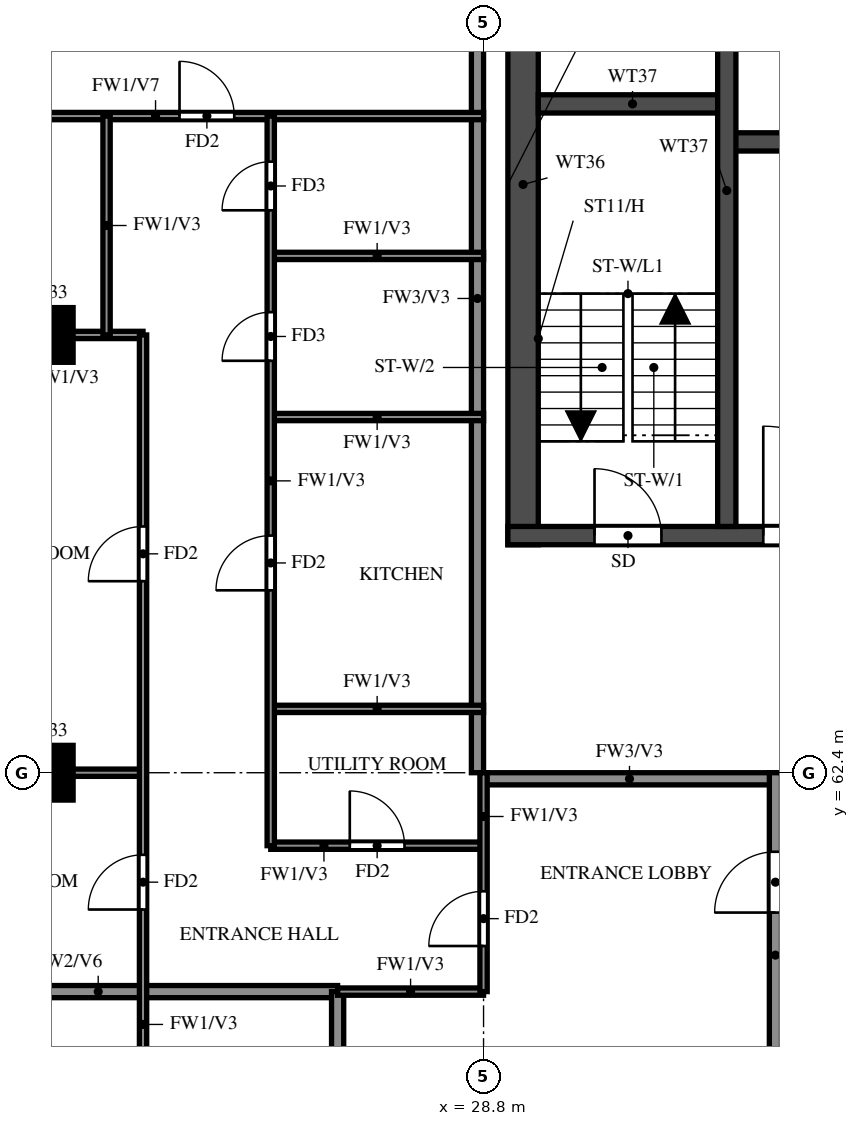
"""IFC4 building model, lengths in metres.
Left out: names, types, materials, properties, quantities, classifications, styles, units other than length and angle.
Written with IfcOpenShell. Run it as: python <this file> out.ifc"""

import sys

from ifc_helpers import new_model, si_unit, direction, frame, frame_2d, origin, origin_2d, place, context, subcontext, project, spatial, rectangle, extrude, source, transform, mapped, element, fill, save


model = new_model("IFC4")
c1 = context("Model", 3, precision=1e-05, world=origin(), true_north=direction((0.0, 1.0)))
c2 = subcontext(c1, "Body", "Model", "MODEL_VIEW")
j1 = project(units=[si_unit("LENGTHUNIT", "METRE"), si_unit("PLANEANGLEUNIT", "RADIAN")], contexts=[c1])
p1 = place(None, origin())
s1 = spatial("IfcSite", under=j1, at=p1, CompositionType="ELEMENT")
p2 = place(p1, origin())
s2 = spatial("IfcBuilding", under=s1, at=p2, CompositionType="ELEMENT")
p3 = place(p2, frame((0.0, 0.0, 211.5)))
s3 = spatial("IfcBuildingStorey", under=s2, at=p3, CompositionType="ELEMENT", Elevation=211.5)
m1 = source(origin(), c2, "Body", "SweptSolid", [
    extrude(rectangle(XDim=0.9, YDim=0.9, at=origin_2d()), origin(), (0.0, 0.0, 1.0), 3.22),
])
for number, where, z_axis, x_axis in (
    (1, (21.6, 62.4, 0.0), (0.0, 0.0, 1.0), (1.0, 0.0, 0.0)),
    (2, (21.6, 69.6, 0.0), (0.0, 0.0, 1.0), (1.0, 0.0, 0.0)),
):
    element("IfcColumn", number, at=place(p3, frame(where, z_axis=z_axis, x_axis=x_axis)), inside=s3, PredefinedType="COLUMN", context=c2, shape_type="MappedRepresentation", body=[
        mapped(m1, transform((0.0, 0.0, 0.0))),
    ])
p4 = place(p3, frame((29.45, 66.15, 0.0), z_axis=(0.0, 0.0, 1.0), x_axis=(0.0, 1.0, 0.0)))
e3 = element("IfcWall", 3, at=p4, inside=s3, PredefinedType="SHEAR", context=c2, shape_type="SweptSolid", body=[
    extrude(rectangle(XDim=11.85, YDim=0.5, at=frame_2d((5.925, 0.0))), origin(), (0.0, 0.0, 1.0), 3.22),
])
p5 = place(p3, frame((29.2, 66.3, 0.0), z_axis=(0.0, 0.0, 1.0), x_axis=(1.0, 0.0, 0.0)))
e4 = element("IfcWall", 4, at=p5, inside=s3, PredefinedType="SHEAR", context=c2, shape_type="SweptSolid", body=[
    extrude(rectangle(XDim=42.4, YDim=0.3, at=frame_2d((21.2, 0.0))), origin(), (0.0, 0.0, 1.0), 3.22),
])
p6 = place(p5, frame((1.425, 0.0, 0.0)))
e5 = element("IfcOpeningElement", 5, at=p6, cuts=e4, PredefinedType="OPENING", context=c2, shape_type="SweptSolid", body=[
    extrude(rectangle(XDim=1.1, YDim=2.1, at=frame_2d((0.55, 1.05))), frame((0.0, 0.16, 0.0), z_axis=(0.0, -1.0, 0.0), x_axis=(1.0, 0.0, 0.0)), (0.0, 0.0, 1.0), 0.32),
])
p7 = place(p5, frame((4.2, 0.0, 0.0)))
e6 = element("IfcOpeningElement", 6, at=p7, cuts=e4, PredefinedType="OPENING", context=c2, shape_type="SweptSolid", body=[
    extrude(rectangle(XDim=1.8, YDim=2.1, at=frame_2d((0.9, 1.05))), frame((0.0, 0.16, 0.0), z_axis=(0.0, -1.0, 0.0), x_axis=(1.0, 0.0, 0.0)), (0.0, 0.0, 1.0), 0.32),
])
p8 = place(p3, frame((32.8, 72.775, 0.0), z_axis=(0.0, 0.0, 1.0), x_axis=(1.0, 0.0, 0.0)))
e7 = element("IfcWall", 7, at=p8, inside=s3, PredefinedType="SHEAR", context=c2, shape_type="SweptSolid", body=[
    extrude(rectangle(XDim=35.2, YDim=0.3, at=frame_2d((17.6, 0.0))), origin(), (0.0, 0.0, 1.0), 3.22),
])
p9 = place(p8, frame((19.8, 0.0, 0.0)))
e8 = element("IfcOpeningElement", 8, at=p9, cuts=e7, PredefinedType="OPENING", context=c2, shape_type="SweptSolid", body=[
    extrude(rectangle(XDim=1.1, YDim=2.1, at=frame_2d((0.55, 1.05))), frame((0.0, 0.16, 0.0), z_axis=(0.0, -1.0, 0.0), x_axis=(1.0, 0.0, 0.0)), (0.0, 0.0, 1.0), 0.32),
])
p10 = place(p8, frame((27.725, 0.0, 0.0)))
e9 = element("IfcOpeningElement", 9, at=p10, cuts=e7, PredefinedType="OPENING", context=c2, shape_type="SweptSolid", body=[
    extrude(rectangle(XDim=1.1, YDim=2.1, at=frame_2d((0.55, 1.05))), frame((0.0, 0.16, 0.0), z_axis=(0.0, -1.0, 0.0), x_axis=(1.0, 0.0, 0.0)), (0.0, 0.0, 1.0), 0.32),
])
p11 = place(p8, frame((30.325, 0.0, 0.0)))
e10 = element("IfcOpeningElement", 10, at=p11, cuts=e7, PredefinedType="OPENING", context=c2, shape_type="SweptSolid", body=[
    extrude(rectangle(XDim=1.1, YDim=2.1, at=frame_2d((0.55, 1.05))), frame((0.0, 0.16, 0.0), z_axis=(0.0, -1.0, 0.0), x_axis=(1.0, 0.0, 0.0)), (0.0, 0.0, 1.0), 0.32),
])
p12 = place(p8, frame((3.825, 0.0, 0.0)))
e11 = element("IfcOpeningElement", 11, at=p12, cuts=e7, PredefinedType="OPENING", context=c2, shape_type="SweptSolid", body=[
    extrude(rectangle(XDim=1.1, YDim=2.1, at=frame_2d((0.55, 1.05))), frame((0.0, 0.16, 0.0), z_axis=(0.0, -1.0, 0.0), x_axis=(1.0, 0.0, 0.0)), (0.0, 0.0, 1.0), 0.32),
])
p13 = place(p8, frame((6.575, 0.0, 0.0)))
e12 = element("IfcOpeningElement", 12, at=p13, cuts=e7, PredefinedType="OPENING", context=c2, shape_type="SweptSolid", body=[
    extrude(rectangle(XDim=1.1, YDim=2.1, at=frame_2d((0.55, 1.05))), frame((0.0, 0.16, 0.0), z_axis=(0.0, -1.0, 0.0), x_axis=(1.0, 0.0, 0.0)), (0.0, 0.0, 1.0), 0.32),
])
p14 = place(p8, frame((9.325, 0.0, 0.0)))
e13 = element("IfcOpeningElement", 13, at=p14, cuts=e7, PredefinedType="OPENING", context=c2, shape_type="SweptSolid", body=[
    extrude(rectangle(XDim=1.1, YDim=2.1, at=frame_2d((0.55, 1.05))), frame((0.0, 0.16, 0.0), z_axis=(0.0, -1.0, 0.0), x_axis=(1.0, 0.0, 0.0)), (0.0, 0.0, 1.0), 0.32),
])
p15 = place(p8, frame((12.075, 0.0, 0.0)))
e14 = element("IfcOpeningElement", 14, at=p15, cuts=e7, PredefinedType="OPENING", context=c2, shape_type="SweptSolid", body=[
    extrude(rectangle(XDim=1.1, YDim=2.1, at=frame_2d((0.55, 1.05))), frame((0.0, 0.16, 0.0), z_axis=(0.0, -1.0, 0.0), x_axis=(1.0, 0.0, 0.0)), (0.0, 0.0, 1.0), 0.32),
])
p16 = place(p8, frame((14.825, 0.0, 0.0)))
e15 = element("IfcOpeningElement", 15, at=p16, cuts=e7, PredefinedType="OPENING", context=c2, shape_type="SweptSolid", body=[
    extrude(rectangle(XDim=1.1, YDim=2.1, at=frame_2d((0.55, 1.05))), frame((0.0, 0.16, 0.0), z_axis=(0.0, -1.0, 0.0), x_axis=(1.0, 0.0, 0.0)), (0.0, 0.0, 1.0), 0.32),
])
p17 = place(p8, frame((17.575, 0.0, 0.0)))
e16 = element("IfcOpeningElement", 16, at=p17, cuts=e7, PredefinedType="OPENING", context=c2, shape_type="SweptSolid", body=[
    extrude(rectangle(XDim=1.1, YDim=2.1, at=frame_2d((0.55, 1.05))), frame((0.0, 0.16, 0.0), z_axis=(0.0, -1.0, 0.0), x_axis=(1.0, 0.0, 0.0)), (0.0, 0.0, 1.0), 0.32),
])
p18 = place(p8, frame((0.95, 0.0, 0.0)))
e17 = element("IfcOpeningElement", 17, at=p18, cuts=e7, PredefinedType="OPENING", context=c2, shape_type="SweptSolid", body=[
    extrude(rectangle(XDim=1.1, YDim=2.1, at=frame_2d((0.55, 1.05))), frame((0.0, 0.16, 0.0), z_axis=(0.0, -1.0, 0.0), x_axis=(1.0, 0.0, 0.0)), (0.0, 0.0, 1.0), 0.32),
])
p19 = place(p3, frame((29.7, 73.4, 0.0), z_axis=(0.0, 0.0, 1.0), x_axis=(1.0, 0.0, 0.0)))
e18 = element("IfcWall", 18, at=p19, inside=s3, PredefinedType="SHEAR", context=c2, shape_type="SweptSolid", body=[
    extrude(rectangle(XDim=3.1, YDim=0.3, at=frame_2d((1.55, 0.0))), origin(), (0.0, 0.0, 1.0), 3.22),
])
p20 = place(p3, frame((32.8, 66.45, 0.0), z_axis=(0.0, 0.0, 1.0), x_axis=(0.0, 1.0, 0.0)))
e19 = element("IfcWall", 19, at=p20, inside=s3, PredefinedType="SHEAR", context=c2, shape_type="SweptSolid", body=[
    extrude(rectangle(XDim=11.05, YDim=0.3, at=frame_2d((5.525, 0.0))), origin(), (0.0, 0.0, 1.0), 3.22),
])
p21 = place(p3, frame((28.8, 62.3, 0.0), z_axis=(0.0, 0.0, 1.0), x_axis=(1.0, 0.0, 0.0)))
e20 = element("IfcWall", 20, at=p21, inside=s3, PredefinedType="SOLIDWALL", context=c2, shape_type="SweptSolid", body=[
    extrude(rectangle(XDim=4.8, YDim=0.2, at=frame_2d((2.4, 0.0))), origin(), (0.0, 0.0, 1.0), 3.22),
])
p22 = place(p3, frame((28.7, 62.4, 0.0), z_axis=(0.0, 0.0, 1.0), x_axis=(0.0, 1.0, 0.0)))
e21 = element("IfcWall", 21, at=p22, inside=s3, PredefinedType="SOLIDWALL", context=c2, shape_type="SweptSolid", body=[
    extrude(rectangle(XDim=15.6, YDim=0.2, at=frame_2d((7.8, 0.0))), origin(), (0.0, 0.0, 1.0), 3.22),
])
p23 = place(p3, frame((33.6, 56.4, 0.0), z_axis=(0.0, 0.0, 1.0), x_axis=(0.0, 1.0, 0.0)))
e22 = element("IfcWall", 22, at=p23, inside=s3, PredefinedType="SOLIDWALL", context=c2, shape_type="SweptSolid", body=[
    extrude(rectangle(XDim=6.0, YDim=0.2, at=frame_2d((3.0, 0.0))), origin(), (0.0, 0.0, 1.0), 3.22),
])
p24 = place(p23, frame((3.7, 0.0, 0.0)))
e23 = element("IfcOpeningElement", 23, at=p24, cuts=e22, PredefinedType="OPENING", context=c2, shape_type="SweptSolid", body=[
    extrude(rectangle(XDim=1.0, YDim=2.1, at=frame_2d((0.5, 1.05))), frame((0.0, 0.11, 0.0), z_axis=(0.0, -1.0, 0.0), x_axis=(1.0, 0.0, 0.0)), (0.0, 0.0, 1.0), 0.22),
])
p25 = place(p3, frame((18.525, 58.8, 0.0), z_axis=(0.0, 0.0, 1.0), x_axis=(1.0, 0.0, 0.0)))
e24 = element("IfcWall", 24, at=p25, inside=s3, PredefinedType="SOLIDWALL", context=c2, shape_type="SweptSolid", body=[
    extrude(rectangle(XDim=7.875, YDim=0.2, at=frame_2d((3.938, 0.0))), origin(), (0.0, 0.0, 1.0), 2.32),
])
p26 = place(p3, frame((26.4, 56.4, 0.0), z_axis=(0.0, 0.0, 1.0), x_axis=(0.0, 1.0, 0.0)))
e25 = element("IfcWall", 25, at=p26, inside=s3, PredefinedType="SOLIDWALL", context=c2, shape_type="SweptSolid", body=[
    extrude(rectangle(XDim=2.4, YDim=0.2, at=frame_2d((1.2, 0.0))), origin(), (0.0, 0.0, 1.0), 3.22),
])
p27 = place(p3, frame((26.4, 58.8, 0.0), z_axis=(0.0, 0.0, 1.0), x_axis=(1.0, 0.0, 0.0)))
e26 = element("IfcWall", 26, at=p27, inside=s3, PredefinedType="PARTITIONING", context=c2, shape_type="SweptSolid", body=[
    extrude(rectangle(XDim=2.4, YDim=0.12, at=frame_2d((1.2, 0.0))), origin(), (0.0, 0.0, 1.0), 3.22),
])
p28 = place(p3, frame((25.3, 61.2, 0.0), z_axis=(0.0, 0.0, 1.0), x_axis=(1.0, 0.0, 0.0)))
e27 = element("IfcWall", 27, at=p28, inside=s3, PredefinedType="PARTITIONING", context=c2, shape_type="SweptSolid", body=[
    extrude(rectangle(XDim=3.5, YDim=0.12, at=frame_2d((1.75, 0.0))), origin(), (0.0, 0.0, 1.0), 3.22),
])
p29 = place(p28, frame((1.3, 0.0, 0.0)))
e28 = element("IfcOpeningElement", 28, at=p29, cuts=e27, PredefinedType="OPENING", context=c2, shape_type="SweptSolid", body=[
    extrude(rectangle(XDim=0.9, YDim=2.1, at=frame_2d((0.45, 1.05))), frame((0.0, 0.07, 0.0), z_axis=(0.0, -1.0, 0.0), x_axis=(1.0, 0.0, 0.0)), (0.0, 0.0, 1.0), 0.14),
])
p30 = place(p3, frame((18.525, 62.4, 0.0), z_axis=(0.0, 0.0, 1.0), x_axis=(1.0, 0.0, 0.0)))
e29 = element("IfcWall", 29, at=p30, inside=s3, PredefinedType="PARTITIONING", context=c2, shape_type="SweptSolid", body=[
    extrude(rectangle(XDim=4.675, YDim=0.12, at=frame_2d((2.337, 0.0))), origin(), (0.0, 0.0, 1.0), 3.22),
])
for number, where, z_axis, x_axis in (
    (30, (25.3, 63.45, 0.0), (0.0, 0.0, 1.0), (1.0, 0.0, 0.0)),
    (31, (25.3, 68.25, 0.0), (0.0, 0.0, 1.0), (1.0, 0.0, 0.0)),
):
    element("IfcWall", number, at=place(p3, frame(where, z_axis=z_axis, x_axis=x_axis)), inside=s3, PredefinedType="PARTITIONING", context=c2, shape_type="SweptSolid", body=[
        extrude(rectangle(XDim=3.5, YDim=0.12, at=frame_2d((1.75, 0.0))), origin(), (0.0, 0.0, 1.0), 3.22),
    ])
p31 = place(p3, frame((18.525, 69.6, 0.0), z_axis=(0.0, 0.0, 1.0), x_axis=(1.0, 0.0, 0.0)))
e32 = element("IfcWall", 32, at=p31, inside=s3, PredefinedType="PARTITIONING", context=c2, shape_type="SweptSolid", body=[
    extrude(rectangle(XDim=4.675, YDim=0.12, at=frame_2d((2.337, 0.0))), origin(), (0.0, 0.0, 1.0), 3.22),
])
p32 = place(p31, frame((1.538, 0.0, 0.0)))
e33 = element("IfcOpeningElement", 33, at=p32, cuts=e32, PredefinedType="OPENING", context=c2, shape_type="SweptSolid", body=[
    extrude(rectangle(XDim=0.8, YDim=2.1, at=frame_2d((0.4, 1.05))), frame((0.0, 0.07, 0.0), z_axis=(0.0, -1.0, 0.0), x_axis=(1.0, 0.0, 0.0)), (0.0, 0.0, 1.0), 0.14),
])
p33 = place(p3, frame((25.3, 70.9, 0.0), z_axis=(0.0, 0.0, 1.0), x_axis=(1.0, 0.0, 0.0)))
e34 = element("IfcWall", 34, at=p33, inside=s3, PredefinedType="PARTITIONING", context=c2, shape_type="SweptSolid", body=[
    extrude(rectangle(XDim=3.5, YDim=0.12, at=frame_2d((1.75, 0.0))), origin(), (0.0, 0.0, 1.0), 3.22),
])
p34 = place(p3, frame((18.525, 73.2, 0.0), z_axis=(0.0, 0.0, 1.0), x_axis=(1.0, 0.0, 0.0)))
e35 = element("IfcWall", 35, at=p34, inside=s3, PredefinedType="PARTITIONING", context=c2, shape_type="SweptSolid", body=[
    extrude(rectangle(XDim=10.275, YDim=0.12, at=frame_2d((5.138, 0.0))), origin(), (0.0, 0.0, 1.0), 2.32),
])
p35 = place(p34, frame((5.275, 0.0, 0.0)))
e36 = element("IfcOpeningElement", 36, at=p35, cuts=e35, PredefinedType="OPENING", context=c2, shape_type="SweptSolid", body=[
    extrude(rectangle(XDim=0.9, YDim=2.1, at=frame_2d((0.45, 1.05))), frame((0.0, 0.07, 0.0), z_axis=(0.0, -1.0, 0.0), x_axis=(1.0, 0.0, 0.0)), (0.0, 0.0, 1.0), 0.14),
])
p36 = place(p3, frame((22.6, 69.6, 0.0), z_axis=(0.0, 0.0, 1.0), x_axis=(0.0, 1.0, 0.0)))
e37 = element("IfcWall", 37, at=p36, inside=s3, PredefinedType="PARTITIONING", context=c2, shape_type="SweptSolid", body=[
    extrude(rectangle(XDim=3.6, YDim=0.12, at=frame_2d((1.8, 0.0))), origin(), (0.0, 0.0, 1.0), 3.22),
])
p37 = place(p3, frame((23.2, 48.0, 0.0), z_axis=(0.0, 0.0, 1.0), x_axis=(0.0, 1.0, 0.0)))
e38 = element("IfcWall", 38, at=p37, inside=s3, PredefinedType="PARTITIONING", context=c2, shape_type="SweptSolid", body=[
    extrude(rectangle(XDim=21.6, YDim=0.12, at=frame_2d((10.8, 0.0))), origin(), (0.0, 0.0, 1.0), 3.22),
])
p38 = place(p37, frame((1.35, 0.0, 0.0)))
e39 = element("IfcOpeningElement", 39, at=p38, cuts=e38, PredefinedType="OPENING", context=c2, shape_type="SweptSolid", body=[
    extrude(rectangle(XDim=0.9, YDim=2.1, at=frame_2d((0.45, 1.05))), frame((0.0, 0.07, 0.0), z_axis=(0.0, -1.0, 0.0), x_axis=(1.0, 0.0, 0.0)), (0.0, 0.0, 1.0), 0.14),
])
p39 = place(p37, frame((4.95, 0.0, 0.0)))
e40 = element("IfcOpeningElement", 40, at=p39, cuts=e38, PredefinedType="OPENING", context=c2, shape_type="SweptSolid", body=[
    extrude(rectangle(XDim=0.9, YDim=2.1, at=frame_2d((0.45, 1.05))), frame((0.0, 0.07, 0.0), z_axis=(0.0, -1.0, 0.0), x_axis=(1.0, 0.0, 0.0)), (0.0, 0.0, 1.0), 0.14),
])
p40 = place(p37, frame((8.25, 0.0, 0.0)))
e41 = element("IfcOpeningElement", 41, at=p40, cuts=e38, PredefinedType="OPENING", context=c2, shape_type="SweptSolid", body=[
    extrude(rectangle(XDim=1.5, YDim=2.1, at=frame_2d((0.75, 1.05))), frame((0.0, 0.07, 0.0), z_axis=(0.0, -1.0, 0.0), x_axis=(1.0, 0.0, 0.0)), (0.0, 0.0, 1.0), 0.14),
])
p41 = place(p37, frame((12.15, 0.0, 0.0)))
e42 = element("IfcOpeningElement", 42, at=p41, cuts=e38, PredefinedType="OPENING", context=c2, shape_type="SweptSolid", body=[
    extrude(rectangle(XDim=0.9, YDim=2.1, at=frame_2d((0.45, 1.05))), frame((0.0, 0.07, 0.0), z_axis=(0.0, -1.0, 0.0), x_axis=(1.0, 0.0, 0.0)), (0.0, 0.0, 1.0), 0.14),
])
p42 = place(p37, frame((17.55, 0.0, 0.0)))
e43 = element("IfcOpeningElement", 43, at=p42, cuts=e38, PredefinedType="OPENING", context=c2, shape_type="SweptSolid", body=[
    extrude(rectangle(XDim=0.9, YDim=2.1, at=frame_2d((0.45, 1.05))), frame((0.0, 0.07, 0.0), z_axis=(0.0, -1.0, 0.0), x_axis=(1.0, 0.0, 0.0)), (0.0, 0.0, 1.0), 0.14),
])
p43 = place(p3, frame((25.3, 61.2, 0.0), z_axis=(0.0, 0.0, 1.0), x_axis=(0.0, 1.0, 0.0)))
e44 = element("IfcWall", 44, at=p43, inside=s3, PredefinedType="PARTITIONING", context=c2, shape_type="SweptSolid", body=[
    extrude(rectangle(XDim=12.0, YDim=0.12, at=frame_2d((6.0, 0.0))), origin(), (0.0, 0.0, 1.0), 3.22),
])
p44 = place(p43, frame((4.2, 0.0, 0.0)))
e45 = element("IfcOpeningElement", 45, at=p44, cuts=e44, PredefinedType="OPENING", context=c2, shape_type="SweptSolid", body=[
    extrude(rectangle(XDim=0.9, YDim=2.1, at=frame_2d((0.45, 1.05))), frame((0.0, 0.07, 0.0), z_axis=(0.0, -1.0, 0.0), x_axis=(1.0, 0.0, 0.0)), (0.0, 0.0, 1.0), 0.14),
])
p45 = place(p43, frame((7.975, 0.0, 0.0)))
e46 = element("IfcOpeningElement", 46, at=p45, cuts=e44, PredefinedType="OPENING", context=c2, shape_type="SweptSolid", body=[
    extrude(rectangle(XDim=0.8, YDim=2.1, at=frame_2d((0.4, 1.05))), frame((0.0, 0.07, 0.0), z_axis=(0.0, -1.0, 0.0), x_axis=(1.0, 0.0, 0.0)), (0.0, 0.0, 1.0), 0.14),
])
p46 = place(p43, frame((10.45, 0.0, 0.0)))
e47 = element("IfcOpeningElement", 47, at=p46, cuts=e44, PredefinedType="OPENING", context=c2, shape_type="SweptSolid", body=[
    extrude(rectangle(XDim=0.8, YDim=2.1, at=frame_2d((0.4, 1.05))), frame((0.0, 0.07, 0.0), z_axis=(0.0, -1.0, 0.0), x_axis=(1.0, 0.0, 0.0)), (0.0, 0.0, 1.0), 0.14),
])
p47 = place(p3, frame((28.8, 58.8, 0.0), z_axis=(0.0, 0.0, 1.0), x_axis=(0.0, 1.0, 0.0)))
e48 = element("IfcWall", 48, at=p47, inside=s3, PredefinedType="PARTITIONING", context=c2, shape_type="SweptSolid", body=[
    extrude(rectangle(XDim=3.6, YDim=0.12, at=frame_2d((1.8, 0.0))), origin(), (0.0, 0.0, 1.0), 3.22),
])
p48 = place(p47, frame((0.75, 0.0, 0.0)))
e49 = element("IfcOpeningElement", 49, at=p48, cuts=e48, PredefinedType="OPENING", context=c2, shape_type="SweptSolid", body=[
    extrude(rectangle(XDim=0.9, YDim=2.1, at=frame_2d((0.45, 1.05))), frame((0.0, 0.07, 0.0), z_axis=(0.0, -1.0, 0.0), x_axis=(1.0, 0.0, 0.0)), (0.0, 0.0, 1.0), 0.14),
])
p49 = place(p6, origin())
e50 = element("IfcDoor", 50, at=p49, inside=s3, OperationType="SINGLE_SWING_LEFT", PredefinedType="DOOR", context=c2, shape_type="SweptSolid", body=[
    extrude(rectangle(XDim=1.1, YDim=2.1, at=frame_2d((0.55, 1.05))), frame((0.0, 0.025, 0.0), z_axis=(0.0, -1.0, 0.0), x_axis=(1.0, 0.0, 0.0)), (0.0, 0.0, 1.0), 0.05),
])
fill(e5, e50)
p50 = place(p7, origin())
e51 = element("IfcDoor", 51, at=p50, inside=s3, OperationType="DOUBLE_DOOR_SINGLE_SWING", PredefinedType="DOOR", context=c2, shape_type="SweptSolid", body=[
    extrude(rectangle(XDim=1.8, YDim=2.1, at=frame_2d((0.9, 1.05))), frame((0.0, 0.025, 0.0), z_axis=(0.0, -1.0, 0.0), x_axis=(1.0, 0.0, 0.0)), (0.0, 0.0, 1.0), 0.05),
])
fill(e6, e51)
p51 = place(p48, origin())
e52 = element("IfcDoor", 52, at=p51, inside=s3, OperationType="SINGLE_SWING_RIGHT", PredefinedType="DOOR", context=c2, shape_type="SweptSolid", body=[
    extrude(rectangle(XDim=0.9, YDim=2.1, at=frame_2d((0.45, 1.05))), frame((0.0, 0.025, 0.0), z_axis=(0.0, -1.0, 0.0), x_axis=(1.0, 0.0, 0.0)), (0.0, 0.0, 1.0), 0.05),
])
fill(e49, e52)
p52 = place(p24, origin())
e53 = element("IfcDoor", 53, at=p52, inside=s3, OperationType="SINGLE_SWING_LEFT", PredefinedType="DOOR", context=c2, shape_type="SweptSolid", body=[
    extrude(rectangle(XDim=1.0, YDim=2.1, at=frame_2d((0.5, 1.05))), frame((0.0, 0.025, 0.0), z_axis=(0.0, -1.0, 0.0), x_axis=(1.0, 0.0, 0.0)), (0.0, 0.0, 1.0), 0.05),
])
fill(e23, e53)
p53 = place(p41, origin())
e54 = element("IfcDoor", 54, at=p53, inside=s3, OperationType="SINGLE_SWING_LEFT", PredefinedType="DOOR", context=c2, shape_type="SweptSolid", body=[
    extrude(rectangle(XDim=0.9, YDim=2.1, at=frame_2d((0.45, 1.05))), frame((0.0, 0.025, 0.0), z_axis=(0.0, -1.0, 0.0), x_axis=(1.0, 0.0, 0.0)), (0.0, 0.0, 1.0), 0.05),
])
fill(e42, e54)
p54 = place(p42, origin())
e55 = element("IfcDoor", 55, at=p54, inside=s3, OperationType="SINGLE_SWING_RIGHT", PredefinedType="DOOR", context=c2, shape_type="SweptSolid", body=[
    extrude(rectangle(XDim=0.9, YDim=2.1, at=frame_2d((0.45, 1.05))), frame((0.0, 0.025, 0.0), z_axis=(0.0, -1.0, 0.0), x_axis=(1.0, 0.0, 0.0)), (0.0, 0.0, 1.0), 0.05),
])
fill(e43, e55)
p55 = place(p35, origin())
e56 = element("IfcDoor", 56, at=p55, inside=s3, OperationType="SINGLE_SWING_LEFT", PredefinedType="DOOR", context=c2, shape_type="SweptSolid", body=[
    extrude(rectangle(XDim=0.9, YDim=2.1, at=frame_2d((0.45, 1.05))), frame((0.0, 0.025, 0.0), z_axis=(0.0, -1.0, 0.0), x_axis=(1.0, 0.0, 0.0)), (0.0, 0.0, 1.0), 0.05),
])
fill(e36, e56)
p56 = place(p29, origin())
e57 = element("IfcDoor", 57, at=p56, inside=s3, OperationType="SINGLE_SWING_RIGHT", PredefinedType="DOOR", context=c2, shape_type="SweptSolid", body=[
    extrude(rectangle(XDim=0.9, YDim=2.1, at=frame_2d((0.45, 1.05))), frame((0.0, 0.025, 0.0), z_axis=(0.0, -1.0, 0.0), x_axis=(1.0, 0.0, 0.0)), (0.0, 0.0, 1.0), 0.05),
])
fill(e28, e57)
p57 = place(p44, origin())
e58 = element("IfcDoor", 58, at=p57, inside=s3, OperationType="SINGLE_SWING_LEFT", PredefinedType="DOOR", context=c2, shape_type="SweptSolid", body=[
    extrude(rectangle(XDim=0.9, YDim=2.1, at=frame_2d((0.45, 1.05))), frame((0.0, 0.025, 0.0), z_axis=(0.0, -1.0, 0.0), x_axis=(1.0, 0.0, 0.0)), (0.0, 0.0, 1.0), 0.05),
])
fill(e45, e58)
p58 = place(p45, origin())
e59 = element("IfcDoor", 59, at=p58, inside=s3, OperationType="SINGLE_SWING_LEFT", PredefinedType="DOOR", context=c2, shape_type="SweptSolid", body=[
    extrude(rectangle(XDim=0.8, YDim=2.1, at=frame_2d((0.4, 1.05))), frame((0.0, 0.025, 0.0), z_axis=(0.0, -1.0, 0.0), x_axis=(1.0, 0.0, 0.0)), (0.0, 0.0, 1.0), 0.05),
])
fill(e46, e59)
p59 = place(p46, origin())
e60 = element("IfcDoor", 60, at=p59, inside=s3, OperationType="SINGLE_SWING_RIGHT", PredefinedType="DOOR", context=c2, shape_type="SweptSolid", body=[
    extrude(rectangle(XDim=0.8, YDim=2.1, at=frame_2d((0.4, 1.05))), frame((0.0, 0.025, 0.0), z_axis=(0.0, -1.0, 0.0), x_axis=(1.0, 0.0, 0.0)), (0.0, 0.0, 1.0), 0.05),
])
fill(e47, e60)
save(model, sys.argv[1])
